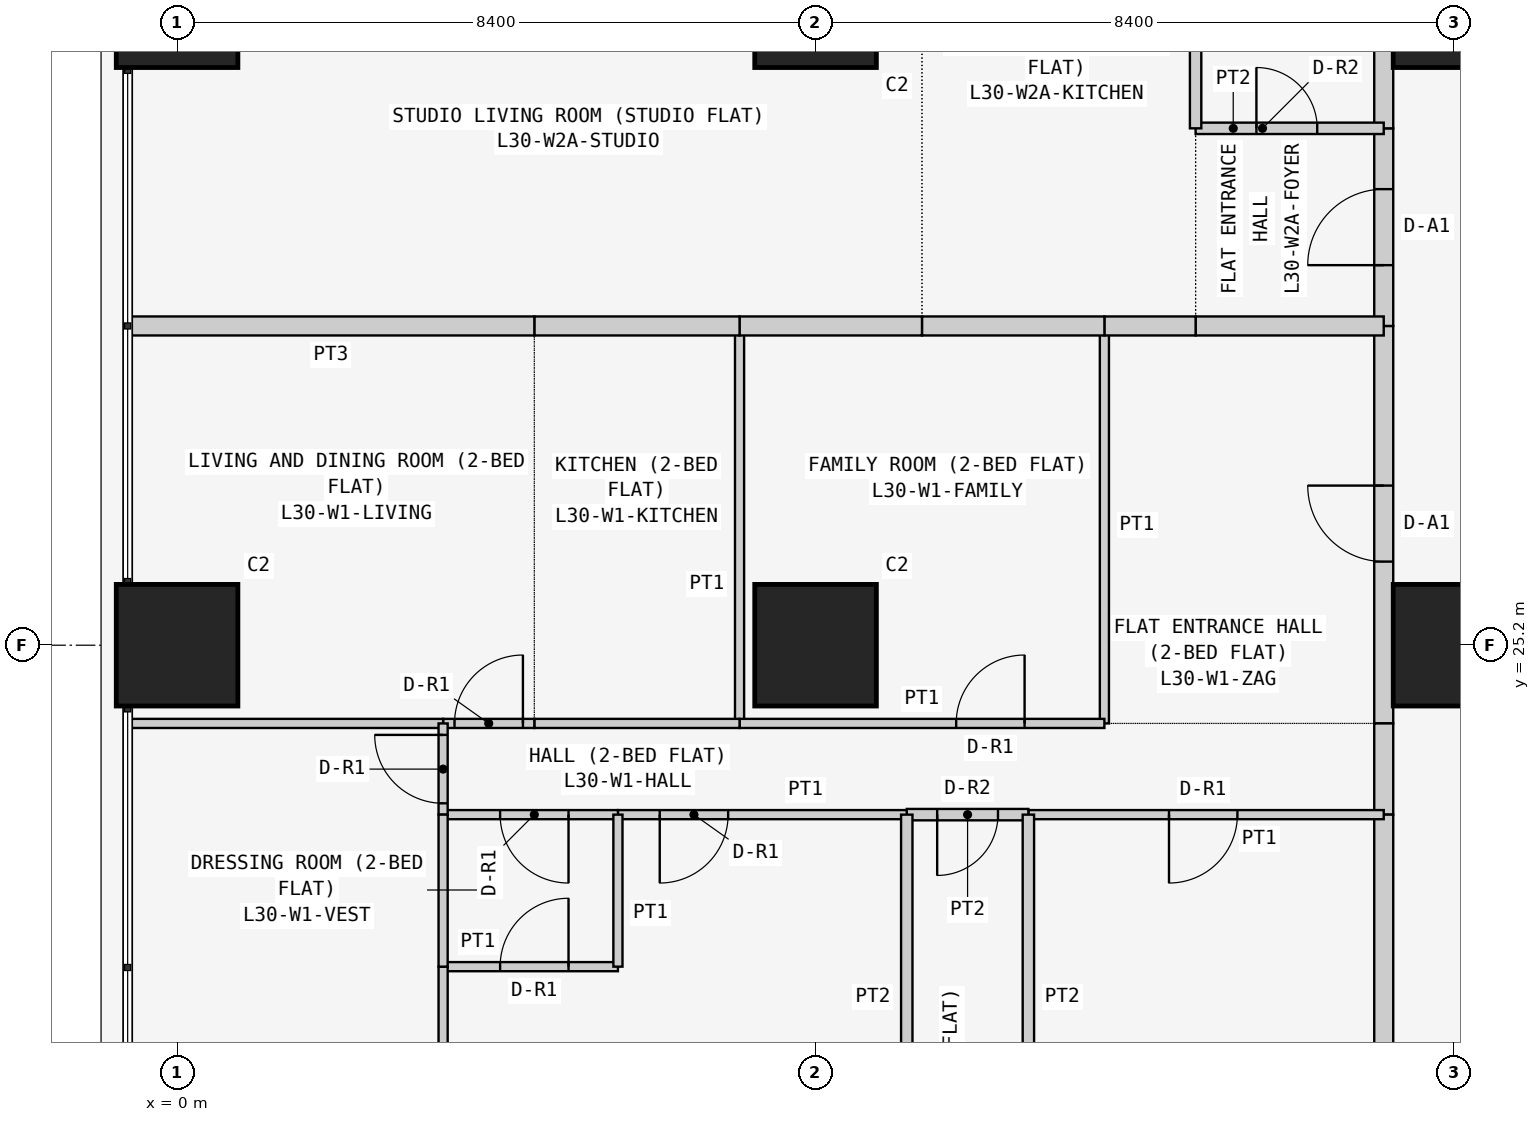
"""IFC4 building model, lengths in metres.
Left out: names, types, materials, properties, quantities, classifications, styles, units other than length and angle.
Written with IfcOpenShell. Run it as: python <this file> out.ifc"""

import sys

from ifc_helpers import new_model, si_unit, direction, frame, frame_2d, origin, origin_2d, place, context, subcontext, project, spatial, rectangle, extrude, element, fill, save


model = new_model("IFC4")
c1 = context("Model", 3, precision=1e-05, world=origin(), true_north=direction((0.0, 1.0)))
c2 = subcontext(c1, "Body", "Model", "MODEL_VIEW")
j1 = project(units=[si_unit("LENGTHUNIT", "METRE"), si_unit("PLANEANGLEUNIT", "RADIAN")], contexts=[c1])
p1 = place(None, origin())
s1 = spatial("IfcSite", under=j1, at=p1, CompositionType="ELEMENT")
p2 = place(p1, origin())
s2 = spatial("IfcBuilding", under=s1, at=p2, CompositionType="ELEMENT")
p3 = place(p2, frame((0.0, 0.0, 119.7)))
s3 = spatial("IfcBuildingStorey", under=s2, at=p3, CompositionType="ELEMENT", Elevation=119.7)
for number, where, z_axis, x_axis in (
    (1, (0.0, 25.2, 0.0), (0.0, 0.0, 1.0), (1.0, 0.0, 0.0)),
    (2, (0.0, 33.6, 0.0), (0.0, 0.0, 1.0), (1.0, 0.0, 0.0)),
    (3, (8.4, 25.2, 0.0), (0.0, 0.0, 1.0), (1.0, 0.0, 0.0)),
    (4, (8.4, 33.6, 0.0), (0.0, 0.0, 1.0), (1.0, 0.0, 0.0)),
    (5, (16.8, 25.2, 0.0), (0.0, 0.0, 1.0), (1.0, 0.0, 0.0)),
    (6, (16.8, 33.6, 0.0), (0.0, 0.0, 1.0), (1.0, 0.0, 0.0)),
):
    element("IfcColumn", number, at=place(p3, frame(where, z_axis=z_axis, x_axis=x_axis)), inside=s3, PredefinedType="COLUMN", context=c2, shape_type="SweptSolid", body=[
        extrude(rectangle(XDim=1.6, YDim=1.6, at=origin_2d()), origin(), (0.0, 0.0, 1.0), 3.6),
    ])
p4 = place(p3, frame((15.875, 24.171, 0.0), z_axis=(0.0, 0.0, 1.0), x_axis=(0.0, 1.0, 0.0)))
e7 = element("IfcWall", 7, at=p4, inside=s3, PredefinedType="PARTITIONING", context=c2, shape_type="SweptSolid", body=[
    extrude(rectangle(XDim=5.229, YDim=0.25, at=frame_2d((2.615, 0.0))), origin(), (0.0, 0.0, 1.0), 3.45),
])
p5 = place(p4, frame((2.129, 0.0, 0.0)))
e8 = element("IfcOpeningElement", 8, at=p5, cuts=e7, PredefinedType="OPENING", context=c2, shape_type="SweptSolid", body=[
    extrude(rectangle(XDim=1.0, YDim=2.1, at=frame_2d((0.5, 1.05))), frame((0.0, 0.135, 0.0), z_axis=(0.0, -1.0, 0.0), x_axis=(1.0, 0.0, 0.0)), (0.0, 0.0, 1.0), 0.27),
])
p6 = place(p3, frame((15.875, 22.971, 0.0), z_axis=(0.0, 0.0, 1.0), x_axis=(0.0, 1.0, 0.0)))
e9 = element("IfcWall", 9, at=p6, inside=s3, PredefinedType="PARTITIONING", context=c2, shape_type="SweptSolid", body=[
    extrude(rectangle(XDim=1.2, YDim=0.25, at=frame_2d((0.6, 0.0))), origin(), (0.0, 0.0, 1.0), 3.45),
])
p7 = place(p3, frame((15.875, 16.1, 0.0), z_axis=(0.0, 0.0, 1.0), x_axis=(0.0, 1.0, 0.0)))
e10 = element("IfcWall", 10, at=p7, inside=s3, PredefinedType="PARTITIONING", context=c2, shape_type="SweptSolid", body=[
    extrude(rectangle(XDim=6.871, YDim=0.25, at=frame_2d((3.436, 0.0))), origin(), (0.0, 0.0, 1.0), 3.45),
])
p8 = place(p3, frame((15.875, 29.4, 0.0), z_axis=(0.0, 0.0, 1.0), x_axis=(0.0, 1.0, 0.0)))
e11 = element("IfcWall", 11, at=p8, inside=s3, PredefinedType="PARTITIONING", context=c2, shape_type="SweptSolid", body=[
    extrude(rectangle(XDim=2.6, YDim=0.25, at=frame_2d((1.3, 0.0))), origin(), (0.0, 0.0, 1.0), 3.45),
])
p9 = place(p8, frame((0.8, 0.0, 0.0)))
e12 = element("IfcOpeningElement", 12, at=p9, cuts=e11, PredefinedType="OPENING", context=c2, shape_type="SweptSolid", body=[
    extrude(rectangle(XDim=1.0, YDim=2.1, at=frame_2d((0.5, 1.05))), frame((0.0, 0.135, 0.0), z_axis=(0.0, -1.0, 0.0), x_axis=(1.0, 0.0, 0.0)), (0.0, 0.0, 1.0), 0.27),
])
p10 = place(p3, frame((15.875, 32.0, 0.0), z_axis=(0.0, 0.0, 1.0), x_axis=(0.0, 1.0, 0.0)))
e13 = element("IfcWall", 13, at=p10, inside=s3, PredefinedType="PARTITIONING", context=c2, shape_type="SweptSolid", body=[
    extrude(rectangle(XDim=2.629, YDim=0.25, at=frame_2d((1.314, 0.0))), origin(), (0.0, 0.0, 1.0), 3.45),
])
p11 = place(p3, frame((12.2, 29.4, 0.0), z_axis=(0.0, 0.0, 1.0), x_axis=(0.0, -1.0, 0.0)))
e14 = element("IfcWall", 14, at=p11, inside=s3, PredefinedType="PARTITIONING", context=c2, shape_type="SweptSolid", body=[
    extrude(rectangle(XDim=5.229, YDim=0.12, at=frame_2d((2.615, 0.0))), origin(), (0.0, 0.0, 1.0), 3.45),
])
p12 = place(p3, frame((15.875, 29.4, 0.0), z_axis=(0.0, 0.0, 1.0), x_axis=(-1.0, 0.0, 0.0)))
e15 = element("IfcWall", 15, at=p12, inside=s3, PredefinedType="PARTITIONING", context=c2, shape_type="SweptSolid", body=[
    extrude(rectangle(XDim=2.475, YDim=0.25, at=frame_2d((1.238, 0.0))), origin(), (0.0, 0.0, 1.0), 3.45),
])
p13 = place(p3, frame((13.4, 29.4, 0.0), z_axis=(0.0, 0.0, 1.0), x_axis=(-1.0, 0.0, 0.0)))
e16 = element("IfcWall", 16, at=p13, inside=s3, PredefinedType="PARTITIONING", context=c2, shape_type="SweptSolid", body=[
    extrude(rectangle(XDim=1.2, YDim=0.25, at=frame_2d((0.6, 0.0))), origin(), (0.0, 0.0, 1.0), 3.45),
])
p14 = place(p3, frame((7.4, 29.4, 0.0), z_axis=(0.0, 0.0, 1.0), x_axis=(0.0, -1.0, 0.0)))
e17 = element("IfcWall", 17, at=p14, inside=s3, PredefinedType="PARTITIONING", context=c2, shape_type="SweptSolid", body=[
    extrude(rectangle(XDim=5.229, YDim=0.12, at=frame_2d((2.615, 0.0))), origin(), (0.0, 0.0, 1.0), 3.45),
])
p15 = place(p3, frame((7.4, 24.171, 0.0), z_axis=(0.0, 0.0, 1.0), x_axis=(1.0, 0.0, 0.0)))
e18 = element("IfcWall", 18, at=p15, inside=s3, PredefinedType="PARTITIONING", context=c2, shape_type="SweptSolid", body=[
    extrude(rectangle(XDim=4.8, YDim=0.12, at=frame_2d((2.4, 0.0))), origin(), (0.0, 0.0, 1.0), 3.45),
])
p16 = place(p15, frame((2.85, 0.0, 0.0)))
e19 = element("IfcOpeningElement", 19, at=p16, cuts=e18, PredefinedType="OPENING", context=c2, shape_type="SweptSolid", body=[
    extrude(rectangle(XDim=0.9, YDim=2.1, at=frame_2d((0.45, 1.05))), frame((0.0, 0.07, 0.0), z_axis=(0.0, -1.0, 0.0), x_axis=(1.0, 0.0, 0.0)), (0.0, 0.0, 1.0), 0.14),
])
p17 = place(p3, frame((12.2, 29.4, 0.0), z_axis=(0.0, 0.0, 1.0), x_axis=(-1.0, 0.0, 0.0)))
e20 = element("IfcWall", 20, at=p17, inside=s3, PredefinedType="PARTITIONING", context=c2, shape_type="SweptSolid", body=[
    extrude(rectangle(XDim=2.4, YDim=0.25, at=frame_2d((1.2, 0.0))), origin(), (0.0, 0.0, 1.0), 3.45),
])
p18 = place(p3, frame((9.8, 29.4, 0.0), z_axis=(0.0, 0.0, 1.0), x_axis=(-1.0, 0.0, 0.0)))
e21 = element("IfcWall", 21, at=p18, inside=s3, PredefinedType="PARTITIONING", context=c2, shape_type="SweptSolid", body=[
    extrude(rectangle(XDim=2.4, YDim=0.25, at=frame_2d((1.2, 0.0))), origin(), (0.0, 0.0, 1.0), 3.45),
])
p19 = place(p3, frame((4.7, 24.171, 0.0), z_axis=(0.0, 0.0, 1.0), x_axis=(1.0, 0.0, 0.0)))
e22 = element("IfcWall", 22, at=p19, inside=s3, PredefinedType="PARTITIONING", context=c2, shape_type="SweptSolid", body=[
    extrude(rectangle(XDim=2.7, YDim=0.12, at=frame_2d((1.35, 0.0))), origin(), (0.0, 0.0, 1.0), 3.45),
])
p20 = place(p3, frame((7.4, 29.4, 0.0), z_axis=(0.0, 0.0, 1.0), x_axis=(-1.0, 0.0, 0.0)))
e23 = element("IfcWall", 23, at=p20, inside=s3, PredefinedType="PARTITIONING", context=c2, shape_type="SweptSolid", body=[
    extrude(rectangle(XDim=2.7, YDim=0.25, at=frame_2d((1.35, 0.0))), origin(), (0.0, 0.0, 1.0), 3.45),
])
p21 = place(p3, frame((3.5, 24.171, 0.0), z_axis=(0.0, 0.0, 1.0), x_axis=(1.0, 0.0, 0.0)))
e24 = element("IfcWall", 24, at=p21, inside=s3, PredefinedType="PARTITIONING", context=c2, shape_type="SweptSolid", body=[
    extrude(rectangle(XDim=1.2, YDim=0.12, at=frame_2d((0.6, 0.0))), origin(), (0.0, 0.0, 1.0), 3.45),
])
p22 = place(p21, frame((0.15, 0.0, 0.0)))
e25 = element("IfcOpeningElement", 25, at=p22, cuts=e24, PredefinedType="OPENING", context=c2, shape_type="SweptSolid", body=[
    extrude(rectangle(XDim=0.9, YDim=2.1, at=frame_2d((0.45, 1.05))), frame((0.0, 0.07, 0.0), z_axis=(0.0, -1.0, 0.0), x_axis=(1.0, 0.0, 0.0)), (0.0, 0.0, 1.0), 0.14),
])
p23 = place(p3, frame((-0.65, 24.171, 0.0), z_axis=(0.0, 0.0, 1.0), x_axis=(1.0, 0.0, 0.0)))
e26 = element("IfcWall", 26, at=p23, inside=s3, PredefinedType="PARTITIONING", context=c2, shape_type="SweptSolid", body=[
    extrude(rectangle(XDim=4.15, YDim=0.12, at=frame_2d((2.075, 0.0))), origin(), (0.0, 0.0, 1.0), 3.45),
])
p24 = place(p3, frame((4.7, 29.4, 0.0), z_axis=(0.0, 0.0, 1.0), x_axis=(-1.0, 0.0, 0.0)))
e27 = element("IfcWall", 27, at=p24, inside=s3, PredefinedType="PARTITIONING", context=c2, shape_type="SweptSolid", body=[
    extrude(rectangle(XDim=5.35, YDim=0.25, at=frame_2d((2.675, 0.0))), origin(), (0.0, 0.0, 1.0), 3.45),
])
p25 = place(p3, frame((11.2, 22.971, 0.0), z_axis=(0.0, 0.0, 1.0), x_axis=(1.0, 0.0, 0.0)))
e28 = element("IfcWall", 28, at=p25, inside=s3, PredefinedType="PARTITIONING", context=c2, shape_type="SweptSolid", body=[
    extrude(rectangle(XDim=4.675, YDim=0.12, at=frame_2d((2.337, 0.0))), origin(), (0.0, 0.0, 1.0), 3.45),
])
p26 = place(p25, frame((1.85, 0.0, 0.0)))
e29 = element("IfcOpeningElement", 29, at=p26, cuts=e28, PredefinedType="OPENING", context=c2, shape_type="SweptSolid", body=[
    extrude(rectangle(XDim=0.9, YDim=2.1, at=frame_2d((0.45, 1.05))), frame((0.0, 0.07, 0.0), z_axis=(0.0, -1.0, 0.0), x_axis=(1.0, 0.0, 0.0)), (0.0, 0.0, 1.0), 0.14),
])
p27 = place(p3, frame((9.6, 22.971, 0.0), z_axis=(0.0, 0.0, 1.0), x_axis=(1.0, 0.0, 0.0)))
e30 = element("IfcWall", 30, at=p27, inside=s3, PredefinedType="PARTITIONING", context=c2, shape_type="SweptSolid", body=[
    extrude(rectangle(XDim=1.6, YDim=0.15, at=frame_2d((0.8, 0.0))), origin(), (0.0, 0.0, 1.0), 3.45),
])
p28 = place(p27, frame((0.4, 0.0, 0.0)))
e31 = element("IfcOpeningElement", 31, at=p28, cuts=e30, PredefinedType="OPENING", context=c2, shape_type="SweptSolid", body=[
    extrude(rectangle(XDim=0.8, YDim=2.1, at=frame_2d((0.4, 1.05))), frame((0.0, 0.085, 0.0), z_axis=(0.0, -1.0, 0.0), x_axis=(1.0, 0.0, 0.0)), (0.0, 0.0, 1.0), 0.17),
])
p29 = place(p3, frame((5.8, 22.971, 0.0), z_axis=(0.0, 0.0, 1.0), x_axis=(1.0, 0.0, 0.0)))
e32 = element("IfcWall", 32, at=p29, inside=s3, PredefinedType="PARTITIONING", context=c2, shape_type="SweptSolid", body=[
    extrude(rectangle(XDim=3.8, YDim=0.12, at=frame_2d((1.9, 0.0))), origin(), (0.0, 0.0, 1.0), 3.45),
])
p30 = place(p29, frame((0.55, 0.0, 0.0)))
e33 = element("IfcOpeningElement", 33, at=p30, cuts=e32, PredefinedType="OPENING", context=c2, shape_type="SweptSolid", body=[
    extrude(rectangle(XDim=0.9, YDim=2.1, at=frame_2d((0.45, 1.05))), frame((0.0, 0.07, 0.0), z_axis=(0.0, -1.0, 0.0), x_axis=(1.0, 0.0, 0.0)), (0.0, 0.0, 1.0), 0.14),
])
p31 = place(p3, frame((3.5, 22.971, 0.0), z_axis=(0.0, 0.0, 1.0), x_axis=(1.0, 0.0, 0.0)))
e34 = element("IfcWall", 34, at=p31, inside=s3, PredefinedType="PARTITIONING", context=c2, shape_type="SweptSolid", body=[
    extrude(rectangle(XDim=2.3, YDim=0.12, at=frame_2d((1.15, 0.0))), origin(), (0.0, 0.0, 1.0), 3.45),
])
p32 = place(p31, frame((0.75, 0.0, 0.0)))
e35 = element("IfcOpeningElement", 35, at=p32, cuts=e34, PredefinedType="OPENING", context=c2, shape_type="SweptSolid", body=[
    extrude(rectangle(XDim=0.9, YDim=2.1, at=frame_2d((0.45, 1.05))), frame((0.0, 0.07, 0.0), z_axis=(0.0, -1.0, 0.0), x_axis=(1.0, 0.0, 0.0)), (0.0, 0.0, 1.0), 0.14),
])
p33 = place(p3, frame((3.5, 24.171, 0.0), z_axis=(0.0, 0.0, 1.0), x_axis=(0.0, -1.0, 0.0)))
e36 = element("IfcWall", 36, at=p33, inside=s3, PredefinedType="PARTITIONING", context=c2, shape_type="SweptSolid", body=[
    extrude(rectangle(XDim=1.2, YDim=0.12, at=frame_2d((0.6, 0.0))), origin(), (0.0, 0.0, 1.0), 3.45),
])
p34 = place(p33, frame((0.151, 0.0, 0.0)))
e37 = element("IfcOpeningElement", 37, at=p34, cuts=e36, PredefinedType="OPENING", context=c2, shape_type="SweptSolid", body=[
    extrude(rectangle(XDim=0.9, YDim=2.1, at=frame_2d((0.45, 1.05))), frame((0.0, 0.07, 0.0), z_axis=(0.0, -1.0, 0.0), x_axis=(1.0, 0.0, 0.0)), (0.0, 0.0, 1.0), 0.14),
])
for number, where, z_axis, x_axis in (
    (38, (11.2, 22.971, 0.0), (0.0, 0.0, 1.0), (0.0, -1.0, 0.0)),
    (39, (9.6, 22.971, 0.0), (0.0, 0.0, 1.0), (0.0, -1.0, 0.0)),
):
    element("IfcWall", number, at=place(p3, frame(where, z_axis=z_axis, x_axis=x_axis)), inside=s3, PredefinedType="PARTITIONING", context=c2, shape_type="SweptSolid", body=[
        extrude(rectangle(XDim=6.871, YDim=0.15, at=frame_2d((3.436, 0.0))), origin(), (0.0, 0.0, 1.0), 3.45),
    ])
p35 = place(p3, frame((3.5, 20.971, 0.0), z_axis=(0.0, 0.0, 1.0), x_axis=(1.0, 0.0, 0.0)))
e40 = element("IfcWall", 40, at=p35, inside=s3, PredefinedType="PARTITIONING", context=c2, shape_type="SweptSolid", body=[
    extrude(rectangle(XDim=2.3, YDim=0.12, at=frame_2d((1.15, 0.0))), origin(), (0.0, 0.0, 1.0), 3.45),
])
p36 = place(p35, frame((0.75, 0.0, 0.0)))
e41 = element("IfcOpeningElement", 41, at=p36, cuts=e40, PredefinedType="OPENING", context=c2, shape_type="SweptSolid", body=[
    extrude(rectangle(XDim=0.9, YDim=2.1, at=frame_2d((0.45, 1.05))), frame((0.0, 0.07, 0.0), z_axis=(0.0, -1.0, 0.0), x_axis=(1.0, 0.0, 0.0)), (0.0, 0.0, 1.0), 0.14),
])
p37 = place(p3, frame((5.8, 20.971, 0.0), z_axis=(0.0, 0.0, 1.0), x_axis=(0.0, 1.0, 0.0)))
e42 = element("IfcWall", 42, at=p37, inside=s3, PredefinedType="PARTITIONING", context=c2, shape_type="SweptSolid", body=[
    extrude(rectangle(XDim=2.0, YDim=0.12, at=frame_2d((1.0, 0.0))), origin(), (0.0, 0.0, 1.0), 3.45),
])
p38 = place(p3, frame((3.5, 16.1, 0.0), z_axis=(0.0, 0.0, 1.0), x_axis=(0.0, 1.0, 0.0)))
e43 = element("IfcWall", 43, at=p38, inside=s3, PredefinedType="PARTITIONING", context=c2, shape_type="SweptSolid", body=[
    extrude(rectangle(XDim=4.871, YDim=0.12, at=frame_2d((2.436, 0.0))), origin(), (0.0, 0.0, 1.0), 3.45),
])
p39 = place(p3, frame((3.5, 22.971, 0.0), z_axis=(0.0, 0.0, 1.0), x_axis=(0.0, -1.0, 0.0)))
e44 = element("IfcWall", 44, at=p39, inside=s3, PredefinedType="PARTITIONING", context=c2, shape_type="SweptSolid", body=[
    extrude(rectangle(XDim=2.0, YDim=0.12, at=frame_2d((1.0, 0.0))), origin(), (0.0, 0.0, 1.0), 3.45),
])
p40 = place(p3, frame((13.4, 32.0, 0.0), z_axis=(0.0, 0.0, 1.0), x_axis=(1.0, 0.0, 0.0)))
e45 = element("IfcWall", 45, at=p40, inside=s3, PredefinedType="PARTITIONING", context=c2, shape_type="SweptSolid", body=[
    extrude(rectangle(XDim=2.475, YDim=0.15, at=frame_2d((1.238, 0.0))), origin(), (0.0, 0.0, 1.0), 3.45),
])
p41 = place(p40, frame((0.8, 0.0, 0.0)))
e46 = element("IfcOpeningElement", 46, at=p41, cuts=e45, PredefinedType="OPENING", context=c2, shape_type="SweptSolid", body=[
    extrude(rectangle(XDim=0.8, YDim=2.1, at=frame_2d((0.4, 1.05))), frame((0.0, 0.085, 0.0), z_axis=(0.0, -1.0, 0.0), x_axis=(1.0, 0.0, 0.0)), (0.0, 0.0, 1.0), 0.17),
])
p42 = place(p3, frame((13.4, 32.0, 0.0), z_axis=(0.0, 0.0, 1.0), x_axis=(0.0, 1.0, 0.0)))
e47 = element("IfcWall", 47, at=p42, inside=s3, PredefinedType="PARTITIONING", context=c2, shape_type="SweptSolid", body=[
    extrude(rectangle(XDim=2.629, YDim=0.15, at=frame_2d((1.314, 0.0))), origin(), (0.0, 0.0, 1.0), 3.45),
])
p43 = place(p5, origin())
e48 = element("IfcDoor", 48, at=p43, inside=s3, OperationType="SINGLE_SWING_RIGHT", PredefinedType="DOOR", context=c2, shape_type="SweptSolid", body=[
    extrude(rectangle(XDim=1.0, YDim=2.1, at=frame_2d((0.5, 1.05))), frame((0.0, 0.025, 0.0), z_axis=(0.0, -1.0, 0.0), x_axis=(1.0, 0.0, 0.0)), (0.0, 0.0, 1.0), 0.05),
])
fill(e8, e48)
p44 = place(p16, origin())
e49 = element("IfcDoor", 49, at=p44, inside=s3, OperationType="SINGLE_SWING_RIGHT", PredefinedType="DOOR", context=c2, shape_type="SweptSolid", body=[
    extrude(rectangle(XDim=0.9, YDim=2.1, at=frame_2d((0.45, 1.05))), frame((0.0, 0.025, 0.0), z_axis=(0.0, -1.0, 0.0), x_axis=(1.0, 0.0, 0.0)), (0.0, 0.0, 1.0), 0.05),
])
fill(e19, e49)
p45 = place(p22, origin())
e50 = element("IfcDoor", 50, at=p45, inside=s3, OperationType="SINGLE_SWING_RIGHT", PredefinedType="DOOR", context=c2, shape_type="SweptSolid", body=[
    extrude(rectangle(XDim=0.9, YDim=2.1, at=frame_2d((0.45, 1.05))), frame((0.0, 0.025, 0.0), z_axis=(0.0, -1.0, 0.0), x_axis=(1.0, 0.0, 0.0)), (0.0, 0.0, 1.0), 0.05),
])
fill(e25, e50)
p46 = place(p26, frame((0.9, 0.0, 0.0), z_axis=(0.0, 0.0, 1.0), x_axis=(-1.0, 0.0, 0.0)))
e51 = element("IfcDoor", 51, at=p46, inside=s3, OperationType="SINGLE_SWING_RIGHT", PredefinedType="DOOR", context=c2, shape_type="SweptSolid", body=[
    extrude(rectangle(XDim=0.9, YDim=2.1, at=frame_2d((0.45, 1.05))), frame((0.0, 0.025, 0.0), z_axis=(0.0, -1.0, 0.0), x_axis=(1.0, 0.0, 0.0)), (0.0, 0.0, 1.0), 0.05),
])
fill(e29, e51)
p47 = place(p28, frame((0.8, 0.0, 0.0), z_axis=(0.0, 0.0, 1.0), x_axis=(-1.0, 0.0, 0.0)))
e52 = element("IfcDoor", 52, at=p47, inside=s3, OperationType="SINGLE_SWING_RIGHT", PredefinedType="DOOR", context=c2, shape_type="SweptSolid", body=[
    extrude(rectangle(XDim=0.8, YDim=2.1, at=frame_2d((0.4, 1.05))), frame((0.0, 0.025, 0.0), z_axis=(0.0, -1.0, 0.0), x_axis=(1.0, 0.0, 0.0)), (0.0, 0.0, 1.0), 0.05),
])
fill(e31, e52)
p48 = place(p30, frame((0.9, 0.0, 0.0), z_axis=(0.0, 0.0, 1.0), x_axis=(-1.0, 0.0, 0.0)))
e53 = element("IfcDoor", 53, at=p48, inside=s3, OperationType="SINGLE_SWING_RIGHT", PredefinedType="DOOR", context=c2, shape_type="SweptSolid", body=[
    extrude(rectangle(XDim=0.9, YDim=2.1, at=frame_2d((0.45, 1.05))), frame((0.0, 0.025, 0.0), z_axis=(0.0, -1.0, 0.0), x_axis=(1.0, 0.0, 0.0)), (0.0, 0.0, 1.0), 0.05),
])
fill(e33, e53)
p49 = place(p32, frame((0.9, 0.0, 0.0), z_axis=(0.0, 0.0, 1.0), x_axis=(-1.0, 0.0, 0.0)))
e54 = element("IfcDoor", 54, at=p49, inside=s3, OperationType="SINGLE_SWING_LEFT", PredefinedType="DOOR", context=c2, shape_type="SweptSolid", body=[
    extrude(rectangle(XDim=0.9, YDim=2.1, at=frame_2d((0.45, 1.05))), frame((0.0, 0.025, 0.0), z_axis=(0.0, -1.0, 0.0), x_axis=(1.0, 0.0, 0.0)), (0.0, 0.0, 1.0), 0.05),
])
fill(e35, e54)
p50 = place(p36, origin())
e55 = element("IfcDoor", 55, at=p50, inside=s3, OperationType="SINGLE_SWING_RIGHT", PredefinedType="DOOR", context=c2, shape_type="SweptSolid", body=[
    extrude(rectangle(XDim=0.9, YDim=2.1, at=frame_2d((0.45, 1.05))), frame((0.0, 0.025, 0.0), z_axis=(0.0, -1.0, 0.0), x_axis=(1.0, 0.0, 0.0)), (0.0, 0.0, 1.0), 0.05),
])
fill(e41, e55)
p51 = place(p34, frame((0.9, 0.0, 0.0), z_axis=(0.0, 0.0, 1.0), x_axis=(-1.0, 0.0, 0.0)))
e56 = element("IfcDoor", 56, at=p51, inside=s3, OperationType="SINGLE_SWING_RIGHT", PredefinedType="DOOR", context=c2, shape_type="SweptSolid", body=[
    extrude(rectangle(XDim=0.9, YDim=2.1, at=frame_2d((0.45, 1.05))), frame((0.0, 0.025, 0.0), z_axis=(0.0, -1.0, 0.0), x_axis=(1.0, 0.0, 0.0)), (0.0, 0.0, 1.0), 0.05),
])
fill(e37, e56)
p52 = place(p9, origin())
e57 = element("IfcDoor", 57, at=p52, inside=s3, OperationType="SINGLE_SWING_LEFT", PredefinedType="DOOR", context=c2, shape_type="SweptSolid", body=[
    extrude(rectangle(XDim=1.0, YDim=2.1, at=frame_2d((0.5, 1.05))), frame((0.0, 0.025, 0.0), z_axis=(0.0, -1.0, 0.0), x_axis=(1.0, 0.0, 0.0)), (0.0, 0.0, 1.0), 0.05),
])
fill(e12, e57)
p53 = place(p41, origin())
e58 = element("IfcDoor", 58, at=p53, inside=s3, OperationType="SINGLE_SWING_LEFT", PredefinedType="DOOR", context=c2, shape_type="SweptSolid", body=[
    extrude(rectangle(XDim=0.8, YDim=2.1, at=frame_2d((0.4, 1.05))), frame((0.0, 0.025, 0.0), z_axis=(0.0, -1.0, 0.0), x_axis=(1.0, 0.0, 0.0)), (0.0, 0.0, 1.0), 0.05),
])
fill(e46, e58)
save(model, sys.argv[1])
